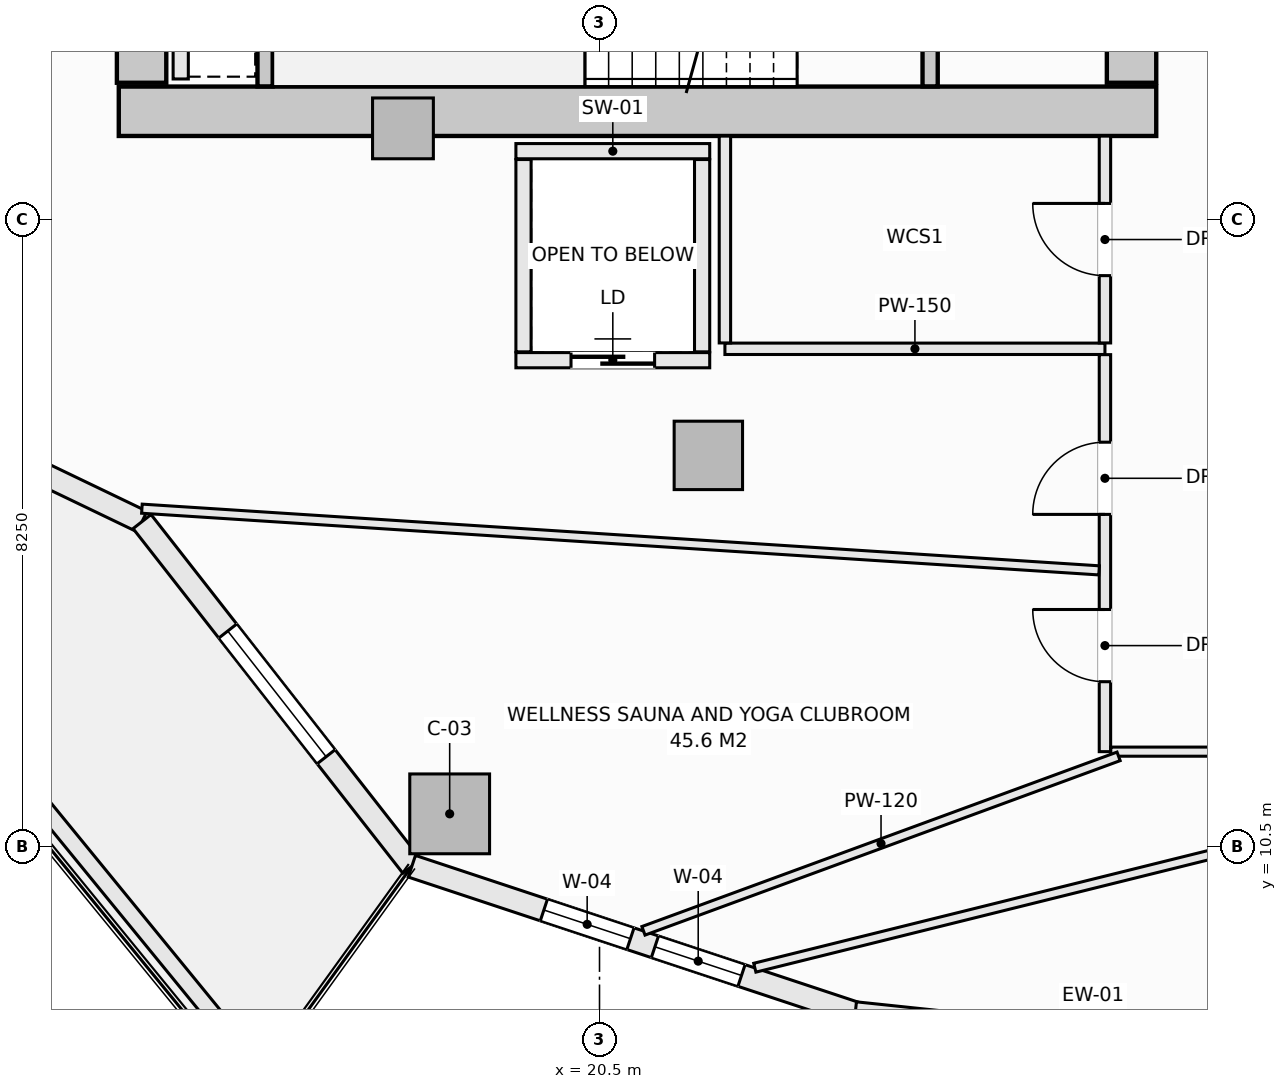
"""IFC4 building model, lengths in metres.
Left out: names, types, materials, properties, quantities, classifications, styles, units other than length and angle.
Written with IfcOpenShell. Run it as: python <this file> out.ifc"""

import sys

from ifc_helpers import new_model, si_unit, direction, frame, frame_2d, origin, origin_2d, place, context, subcontext, project, spatial, rectangle, extrude, element, fill, save


model = new_model("IFC4")
c1 = context("Model", 3, precision=1e-05, world=origin(), true_north=direction((0.0, 1.0)))
c2 = subcontext(c1, "Body", "Model", "MODEL_VIEW")
j1 = project(units=[si_unit("LENGTHUNIT", "METRE"), si_unit("PLANEANGLEUNIT", "RADIAN")], contexts=[c1])
p1 = place(None, origin())
s1 = spatial("IfcSite", under=j1, at=p1, CompositionType="ELEMENT")
p2 = place(p1, origin())
s2 = spatial("IfcBuilding", under=s1, at=p2, CompositionType="ELEMENT")
p3 = place(p2, frame((0.0, 0.0, 129.1)))
s3 = spatial("IfcBuildingStorey", under=s2, at=p3, CompositionType="ELEMENT", Elevation=129.1)
p4 = place(p3, frame((14.175, 20.175, -0.27), z_axis=(0.0, 0.0, 1.0), x_axis=(1.0, 0.0, 0.0)))
e1 = element("IfcWall", 1, at=p4, inside=s3, PredefinedType="SHEAR", context=c2, shape_type="SweptSolid", body=[
    extrude(rectangle(XDim=13.65, YDim=0.65, at=frame_2d((6.825, 0.0))), origin(), (0.0, 0.0, 1.0), 3.4),
])
p5 = place(p3, frame((14.475, 20.55, -0.27), z_axis=(0.0, 0.0, 1.0), x_axis=(0.0, 1.0, 0.0)))
e2 = element("IfcWall", 2, at=p5, inside=s3, PredefinedType="SHEAR", context=c2, shape_type="SweptSolid", body=[
    extrude(rectangle(XDim=12.9, YDim=0.65, at=frame_2d((6.45, 0.0))), origin(), (0.0, 0.0, 1.0), 3.4),
])
p6 = place(p3, frame((27.5, 20.55, -0.27), z_axis=(0.0, 0.0, 1.0), x_axis=(0.0, 1.0, 0.0)))
e3 = element("IfcWall", 3, at=p6, inside=s3, PredefinedType="SHEAR", context=c2, shape_type="SweptSolid", body=[
    extrude(rectangle(XDim=1.5, YDim=0.65, at=frame_2d((0.75, 0.0))), origin(), (0.0, 0.0, 1.0), 3.4),
])
p7 = place(p3, frame((18.529, 10.932, -0.27), z_axis=(0.0, 0.0, 1.0), x_axis=(1.0, 0.0, 0.0)))
e4 = element("IfcColumn", 4, at=p7, inside=s3, PredefinedType="COLUMN", context=c2, shape_type="SweptSolid", body=[
    extrude(rectangle(XDim=1.05, YDim=1.05, at=origin_2d()), origin(), (0.0, 0.0, 1.0), 3.4),
])
p8 = place(p3, frame((21.932, 15.648, -0.27), z_axis=(0.0, 0.0, 1.0), x_axis=(1.0, 0.0, 0.0)))
e5 = element("IfcColumn", 5, at=p8, inside=s3, PredefinedType="COLUMN", context=c2, shape_type="SweptSolid", body=[
    extrude(rectangle(XDim=0.9, YDim=0.9, at=origin_2d()), origin(), (0.0, 0.0, 1.0), 3.4),
])
p9 = place(p3, frame((17.914, 19.95, -0.27), z_axis=(0.0, 0.0, 1.0), x_axis=(1.0, 0.0, 0.0)))
e6 = element("IfcColumn", 6, at=p9, inside=s3, PredefinedType="PILASTER", context=c2, shape_type="SweptSolid", body=[
    extrude(rectangle(XDim=0.8, YDim=0.8, at=origin_2d()), origin(), (0.0, 0.0, 1.0), 3.4),
])
p10 = place(p3, frame((9.178, 17.325, 0.0), z_axis=(0.0, 0.0, 1.0), x_axis=(0.901370184739, -0.433049408339, 0.0)))
e7 = element("IfcWall", 7, at=p10, inside=s3, PredefinedType="SOLIDWALL", context=c2, shape_type="SweptSolid", body=[
    extrude(rectangle(XDim=5.884, YDim=0.3, at=frame_2d((2.942, 0.0))), origin(), (0.0, 0.0, 1.0), 2.653),
])
p11 = place(p10, frame((2.042, 0.0, 0.0)))
e8 = element("IfcOpeningElement", 8, at=p11, cuts=e7, PredefinedType="OPENING", context=c2, shape_type="SweptSolid", body=[
    extrude(rectangle(XDim=1.8, YDim=2.25, at=frame_2d((0.9, 1.125))), frame((0.0, 0.16, 0.0), z_axis=(0.0, -1.0, 0.0), x_axis=(1.0, 0.0, 0.0)), (0.0, 0.0, 1.0), 0.32),
])
p12 = place(p3, frame((14.481, 14.777, 0.0), z_axis=(0.0, 0.0, 1.0), x_axis=(0.616435134162, -0.787405693001, 0.0)))
e9 = element("IfcWall", 9, at=p12, inside=s3, PredefinedType="SOLIDWALL", context=c2, shape_type="SweptSolid", body=[
    extrude(rectangle(XDim=5.759, YDim=0.3, at=frame_2d((2.879, 0.0))), origin(), (0.0, 0.0, 1.0), 2.653),
])
p13 = place(p12, frame((1.829, 0.0, 0.74)))
e10 = element("IfcOpeningElement", 10, at=p13, cuts=e9, PredefinedType="OPENING", context=c2, shape_type="SweptSolid", body=[
    extrude(rectangle(XDim=2.1, YDim=1.7, at=frame_2d((1.05, 0.85))), frame((0.0, 0.16, 0.0), z_axis=(0.0, -1.0, 0.0), x_axis=(1.0, 0.0, 0.0)), (0.0, 0.0, 1.0), 0.32),
])
p14 = place(p3, frame((18.031, 10.242, 0.0), z_axis=(0.0, 0.0, 1.0), x_axis=(0.949238009374, -0.314558741032, 0.0)))
e11 = element("IfcWall", 11, at=p14, inside=s3, PredefinedType="SOLIDWALL", context=c2, shape_type="SweptSolid", body=[
    extrude(rectangle(XDim=6.146, YDim=0.3, at=frame_2d((3.073, 0.0))), origin(), (0.0, 0.0, 1.0), 2.653),
])
p15 = place(p14, frame((1.83, 0.0, 0.74)))
e12 = element("IfcOpeningElement", 12, at=p15, cuts=e11, PredefinedType="OPENING", context=c2, shape_type="SweptSolid", body=[
    extrude(rectangle(XDim=1.2, YDim=1.7, at=frame_2d((0.6, 0.85))), frame((0.0, 0.16, 0.0), z_axis=(0.0, -1.0, 0.0), x_axis=(1.0, 0.0, 0.0)), (0.0, 0.0, 1.0), 0.32),
])
p16 = place(p14, frame((3.369, 0.0, 0.74)))
e13 = element("IfcOpeningElement", 13, at=p16, cuts=e11, PredefinedType="OPENING", context=c2, shape_type="SweptSolid", body=[
    extrude(rectangle(XDim=1.2, YDim=1.7, at=frame_2d((0.6, 0.85))), frame((0.0, 0.16, 0.0), z_axis=(0.0, -1.0, 0.0), x_axis=(1.0, 0.0, 0.0)), (0.0, 0.0, 1.0), 0.32),
])
p17 = place(p3, frame((23.865, 8.309, 0.0), z_axis=(0.0, 0.0, 1.0), x_axis=(0.994498012394, -0.104755445421, 0.0)))
e14 = element("IfcWall", 14, at=p17, inside=s3, PredefinedType="SOLIDWALL", context=c2, shape_type="SweptSolid", body=[
    extrude(rectangle(XDim=6.295, YDim=0.3, at=frame_2d((3.147, 0.0))), origin(), (0.0, 0.0, 1.0), 2.653),
])
p18 = place(p17, frame((2.097, 0.0, 0.74)))
e15 = element("IfcOpeningElement", 15, at=p18, cuts=e14, PredefinedType="OPENING", context=c2, shape_type="SweptSolid", body=[
    extrude(rectangle(XDim=2.1, YDim=1.7, at=frame_2d((1.05, 0.85))), frame((0.0, 0.16, 0.0), z_axis=(0.0, -1.0, 0.0), x_axis=(1.0, 0.0, 0.0)), (0.0, 0.0, 1.0), 0.32),
])
p19 = place(p3, frame((11.791, 12.726, 0.0), z_axis=(0.0, 0.0, 1.0), x_axis=(0.633002467947, -0.77414977593, 0.0)))
e16 = element("IfcWall", 16, at=p19, inside=s3, PredefinedType="PARAPET", context=c2, shape_type="SweptSolid", body=[
    extrude(rectangle(XDim=6.78, YDim=0.22, at=frame_2d((3.39, 0.0))), origin(), (0.0, 0.0, 1.0), 0.52),
])
p20 = place(p3, frame((24.85, 20.502, -0.27), z_axis=(0.0, 0.0, 1.0), x_axis=(0.0, 1.0, 0.0)))
e17 = element("IfcWall", 17, at=p20, inside=s3, PredefinedType="SHEAR", context=c2, shape_type="SweptSolid", body=[
    extrude(rectangle(XDim=3.038, YDim=0.2, at=frame_2d((1.519, 0.0))), origin(), (0.0, 0.0, 1.0), 3.4),
])
p21 = place(p20, frame((0.969, 0.0, 0.27)))
e18 = element("IfcOpeningElement", 18, at=p21, cuts=e17, PredefinedType="OPENING", context=c2, shape_type="SweptSolid", body=[
    extrude(rectangle(XDim=1.1, YDim=2.15, at=frame_2d((0.55, 1.075))), frame((0.0, 0.11, 0.0), z_axis=(0.0, -1.0, 0.0), x_axis=(1.0, 0.0, 0.0)), (0.0, 0.0, 1.0), 0.22),
])
p22 = place(p3, frame((16.1, 20.502, -0.27), z_axis=(0.0, 0.0, 1.0), x_axis=(0.0, 1.0, 0.0)))
e19 = element("IfcWall", 19, at=p22, inside=s3, PredefinedType="SHEAR", context=c2, shape_type="SweptSolid", body=[
    extrude(rectangle(XDim=3.036, YDim=0.2, at=frame_2d((1.518, 0.0))), origin(), (0.0, 0.0, 1.0), 3.4),
])
p23 = place(p3, frame((19.4, 19.65, 0.0), z_axis=(0.0, 0.0, 1.0), x_axis=(1.0, 0.0, 0.0)))
e20 = element("IfcWall", 20, at=p23, inside=s3, PredefinedType="SOLIDWALL", context=c2, shape_type="SweptSolid", body=[
    extrude(rectangle(XDim=2.55, YDim=0.2, at=frame_2d((1.275, 0.0))), origin(), (0.0, 0.0, 1.0), 3.13),
])
p24 = place(p3, frame((19.4, 16.9, 0.0), z_axis=(0.0, 0.0, 1.0), x_axis=(1.0, 0.0, 0.0)))
e21 = element("IfcWall", 21, at=p24, inside=s3, PredefinedType="SOLIDWALL", context=c2, shape_type="SweptSolid", body=[
    extrude(rectangle(XDim=2.55, YDim=0.2, at=frame_2d((1.275, 0.0))), origin(), (0.0, 0.0, 1.0), 3.13),
])
p25 = place(p24, frame((0.725, 0.0, 0.0)))
e22 = element("IfcOpeningElement", 22, at=p25, cuts=e21, PredefinedType="OPENING", context=c2, shape_type="SweptSolid", body=[
    extrude(rectangle(XDim=1.1, YDim=2.2, at=frame_2d((0.55, 1.1))), frame((0.0, 0.11, 0.0), z_axis=(0.0, -1.0, 0.0), x_axis=(1.0, 0.0, 0.0)), (0.0, 0.0, 1.0), 0.22),
])
for number, where, z_axis, x_axis in (
    (23, (19.5, 17.01, 0.0), (0.0, 0.0, 1.0), (0.0, 1.0, 0.0)),
    (24, (21.85, 17.01, 0.0), (0.0, 0.0, 1.0), (0.0, 1.0, 0.0)),
):
    element("IfcWall", number, at=place(p3, frame(where, z_axis=z_axis, x_axis=x_axis)), inside=s3, PredefinedType="SOLIDWALL", context=c2, shape_type="SweptSolid", body=[
        extrude(rectangle(XDim=2.53, YDim=0.2, at=frame_2d((1.265, 0.0))), origin(), (0.0, 0.0, 1.0), 3.13),
    ])
p26 = place(p3, frame((14.99, 20.6, 0.0), z_axis=(0.0, 0.0, 1.0), x_axis=(0.0, 1.0, 0.0)))
e25 = element("IfcWall", 25, at=p26, inside=s3, PredefinedType="SOLIDWALL", context=c2, shape_type="SweptSolid", body=[
    extrude(rectangle(XDim=2.85, YDim=0.2, at=frame_2d((1.425, 0.0))), origin(), (0.0, 0.0, 1.0), 3.13),
])
p27 = place(p3, frame((22.15, 17.05, 0.0), z_axis=(0.0, 0.0, 1.0), x_axis=(1.0, 0.0, 0.0)))
e26 = element("IfcWall", 26, at=p27, inside=s3, PredefinedType="PARTITIONING", context=c2, shape_type="SweptSolid", body=[
    extrude(rectangle(XDim=5.0, YDim=0.15, at=frame_2d((2.5, 0.0))), origin(), (0.0, 0.0, 1.0), 3.13),
])
p28 = place(p3, frame((22.15, 17.127, 0.0), z_axis=(0.0, 0.0, 1.0), x_axis=(0.0, 1.0, 0.0)))
e27 = element("IfcWall", 27, at=p28, inside=s3, PredefinedType="PARTITIONING", context=c2, shape_type="SweptSolid", body=[
    extrude(rectangle(XDim=2.721, YDim=0.15, at=frame_2d((1.36, 0.0))), origin(), (0.0, 0.0, 1.0), 3.13),
])
p29 = place(p3, frame((27.15, 11.75, 0.0), z_axis=(0.0, 0.0, 1.0), x_axis=(0.0, 1.0, 0.0)))
e28 = element("IfcWall", 28, at=p29, inside=s3, PredefinedType="PARTITIONING", context=c2, shape_type="SweptSolid", body=[
    extrude(rectangle(XDim=5.223, YDim=0.15, at=frame_2d((2.611, 0.0))), origin(), (0.0, 0.0, 1.0), 3.13),
])
p30 = place(p29, frame((3.121, 0.0, 0.0)))
e29 = element("IfcOpeningElement", 29, at=p30, cuts=e28, PredefinedType="OPENING", context=c2, shape_type="SweptSolid", body=[
    extrude(rectangle(XDim=0.95, YDim=2.1, at=frame_2d((0.475, 1.05))), frame((0.0, 0.085, 0.0), z_axis=(0.0, -1.0, 0.0), x_axis=(1.0, 0.0, 0.0)), (0.0, 0.0, 1.0), 0.17),
])
p31 = place(p29, frame((0.92, 0.0, 0.0)))
e30 = element("IfcOpeningElement", 30, at=p31, cuts=e28, PredefinedType="OPENING", context=c2, shape_type="SweptSolid", body=[
    extrude(rectangle(XDim=0.95, YDim=2.1, at=frame_2d((0.475, 1.05))), frame((0.0, 0.085, 0.0), z_axis=(0.0, -1.0, 0.0), x_axis=(1.0, 0.0, 0.0)), (0.0, 0.0, 1.0), 0.17),
])
p32 = place(p3, frame((27.15, 17.127, 0.0), z_axis=(0.0, 0.0, 1.0), x_axis=(0.0, 1.0, 0.0)))
e31 = element("IfcWall", 31, at=p32, inside=s3, PredefinedType="PARTITIONING", context=c2, shape_type="SweptSolid", body=[
    extrude(rectangle(XDim=2.721, YDim=0.15, at=frame_2d((1.36, 0.0))), origin(), (0.0, 0.0, 1.0), 3.13),
])
p33 = place(p32, frame((0.885, 0.0, 0.0)))
e32 = element("IfcOpeningElement", 32, at=p33, cuts=e31, PredefinedType="OPENING", context=c2, shape_type="SweptSolid", body=[
    extrude(rectangle(XDim=0.95, YDim=2.1, at=frame_2d((0.475, 1.05))), frame((0.0, 0.085, 0.0), z_axis=(0.0, -1.0, 0.0), x_axis=(1.0, 0.0, 0.0)), (0.0, 0.0, 1.0), 0.17),
])
p34 = place(p3, frame((27.227, 11.75, 0.0), z_axis=(0.0, 0.0, 1.0), x_axis=(1.0, 0.0, 0.0)))
e33 = element("IfcWall", 33, at=p34, inside=s3, PredefinedType="PARTITIONING", context=c2, shape_type="SweptSolid", body=[
    extrude(rectangle(XDim=8.661, YDim=0.12, at=frame_2d((4.331, 0.0))), origin(), (0.0, 0.0, 1.0), 3.13),
])
p35 = place(p34, frame((6.659, 0.0, 0.0)))
e34 = element("IfcOpeningElement", 34, at=p35, cuts=e33, PredefinedType="OPENING", context=c2, shape_type="SweptSolid", body=[
    extrude(rectangle(XDim=0.95, YDim=2.1, at=frame_2d((0.475, 1.05))), frame((0.0, 0.07, 0.0), z_axis=(0.0, -1.0, 0.0), x_axis=(1.0, 0.0, 0.0)), (0.0, 0.0, 1.0), 0.14),
])
p36 = place(p3, frame((14.479, 14.947, 0.0), z_axis=(0.0, 0.0, 1.0), x_axis=(0.997930277746, -0.064305215633, 0.0)))
e35 = element("IfcWall", 35, at=p36, inside=s3, PredefinedType="PARTITIONING", context=c2, shape_type="SweptSolid", body=[
    extrude(rectangle(XDim=12.62, YDim=0.12, at=frame_2d((6.31, 0.0))), origin(), (0.0, 0.0, 1.0), 2.812),
])
p37 = place(p3, frame((21.078, 9.393, 0.0), z_axis=(0.0, 0.0, 1.0), x_axis=(0.938728109135, 0.344658580511, 0.0)))
e36 = element("IfcWall", 36, at=p37, inside=s3, PredefinedType="PARTITIONING", context=c2, shape_type="SweptSolid", body=[
    extrude(rectangle(XDim=6.659, YDim=0.12, at=frame_2d((3.33, 0.0))), origin(), (0.0, 0.0, 1.0), 2.653),
])
p38 = place(p3, frame((22.543, 8.907, 0.0), z_axis=(0.0, 0.0, 1.0), x_axis=(0.970574423873, 0.240801344938, 0.0)))
e37 = element("IfcWall", 37, at=p38, inside=s3, PredefinedType="PARTITIONING", context=c2, shape_type="SweptSolid", body=[
    extrude(rectangle(XDim=11.298, YDim=0.12, at=frame_2d((5.649, 0.0))), origin(), (0.0, 0.0, 1.0), 2.653),
])
p39 = place(p13, origin())
e38 = element("IfcWindow", 38, at=p39, inside=s3, PartitioningType="SINGLE_PANEL", PredefinedType="WINDOW", context=c2, shape_type="SweptSolid", body=[
    extrude(rectangle(XDim=2.1, YDim=1.7, at=frame_2d((1.05, 0.85))), frame((0.0, 0.03, 0.0), z_axis=(0.0, -1.0, 0.0), x_axis=(1.0, 0.0, 0.0)), (0.0, 0.0, 1.0), 0.06),
])
fill(e10, e38)
p40 = place(p15, origin())
e39 = element("IfcWindow", 39, at=p40, inside=s3, PartitioningType="SINGLE_PANEL", PredefinedType="WINDOW", context=c2, shape_type="SweptSolid", body=[
    extrude(rectangle(XDim=1.2, YDim=1.7, at=frame_2d((0.6, 0.85))), frame((0.0, 0.03, 0.0), z_axis=(0.0, -1.0, 0.0), x_axis=(1.0, 0.0, 0.0)), (0.0, 0.0, 1.0), 0.06),
])
fill(e12, e39)
p41 = place(p25, origin())
e40 = element("IfcDoor", 40, at=p41, inside=s3, OperationType="SLIDING_TO_LEFT", PredefinedType="DOOR", context=c2, shape_type="SweptSolid", body=[
    extrude(rectangle(XDim=1.1, YDim=2.2, at=frame_2d((0.55, 1.1))), frame((0.0, 0.025, 0.0), z_axis=(0.0, -1.0, 0.0), x_axis=(1.0, 0.0, 0.0)), (0.0, 0.0, 1.0), 0.05),
])
fill(e22, e40)
p42 = place(p33, origin())
e41 = element("IfcDoor", 41, at=p42, inside=s3, OperationType="SINGLE_SWING_RIGHT", PredefinedType="DOOR", context=c2, shape_type="SweptSolid", body=[
    extrude(rectangle(XDim=0.95, YDim=2.1, at=frame_2d((0.475, 1.05))), frame((0.0, 0.025, 0.0), z_axis=(0.0, -1.0, 0.0), x_axis=(1.0, 0.0, 0.0)), (0.0, 0.0, 1.0), 0.05),
])
fill(e32, e41)
p43 = place(p30, origin())
e42 = element("IfcDoor", 42, at=p43, inside=s3, OperationType="SINGLE_SWING_LEFT", PredefinedType="DOOR", context=c2, shape_type="SweptSolid", body=[
    extrude(rectangle(XDim=0.95, YDim=2.1, at=frame_2d((0.475, 1.05))), frame((0.0, 0.025, 0.0), z_axis=(0.0, -1.0, 0.0), x_axis=(1.0, 0.0, 0.0)), (0.0, 0.0, 1.0), 0.05),
])
fill(e29, e42)
p44 = place(p31, origin())
e43 = element("IfcDoor", 43, at=p44, inside=s3, OperationType="SINGLE_SWING_RIGHT", PredefinedType="DOOR", context=c2, shape_type="SweptSolid", body=[
    extrude(rectangle(XDim=0.95, YDim=2.1, at=frame_2d((0.475, 1.05))), frame((0.0, 0.025, 0.0), z_axis=(0.0, -1.0, 0.0), x_axis=(1.0, 0.0, 0.0)), (0.0, 0.0, 1.0), 0.05),
])
fill(e30, e43)
p45 = place(p16, origin())
e44 = element("IfcWindow", 44, at=p45, inside=s3, PartitioningType="SINGLE_PANEL", PredefinedType="WINDOW", context=c2, shape_type="SweptSolid", body=[
    extrude(rectangle(XDim=1.2, YDim=1.7, at=frame_2d((0.6, 0.85))), frame((0.0, 0.03, 0.0), z_axis=(0.0, -1.0, 0.0), x_axis=(1.0, 0.0, 0.0)), (0.0, 0.0, 1.0), 0.06),
])
fill(e13, e44)
save(model, sys.argv[1])
